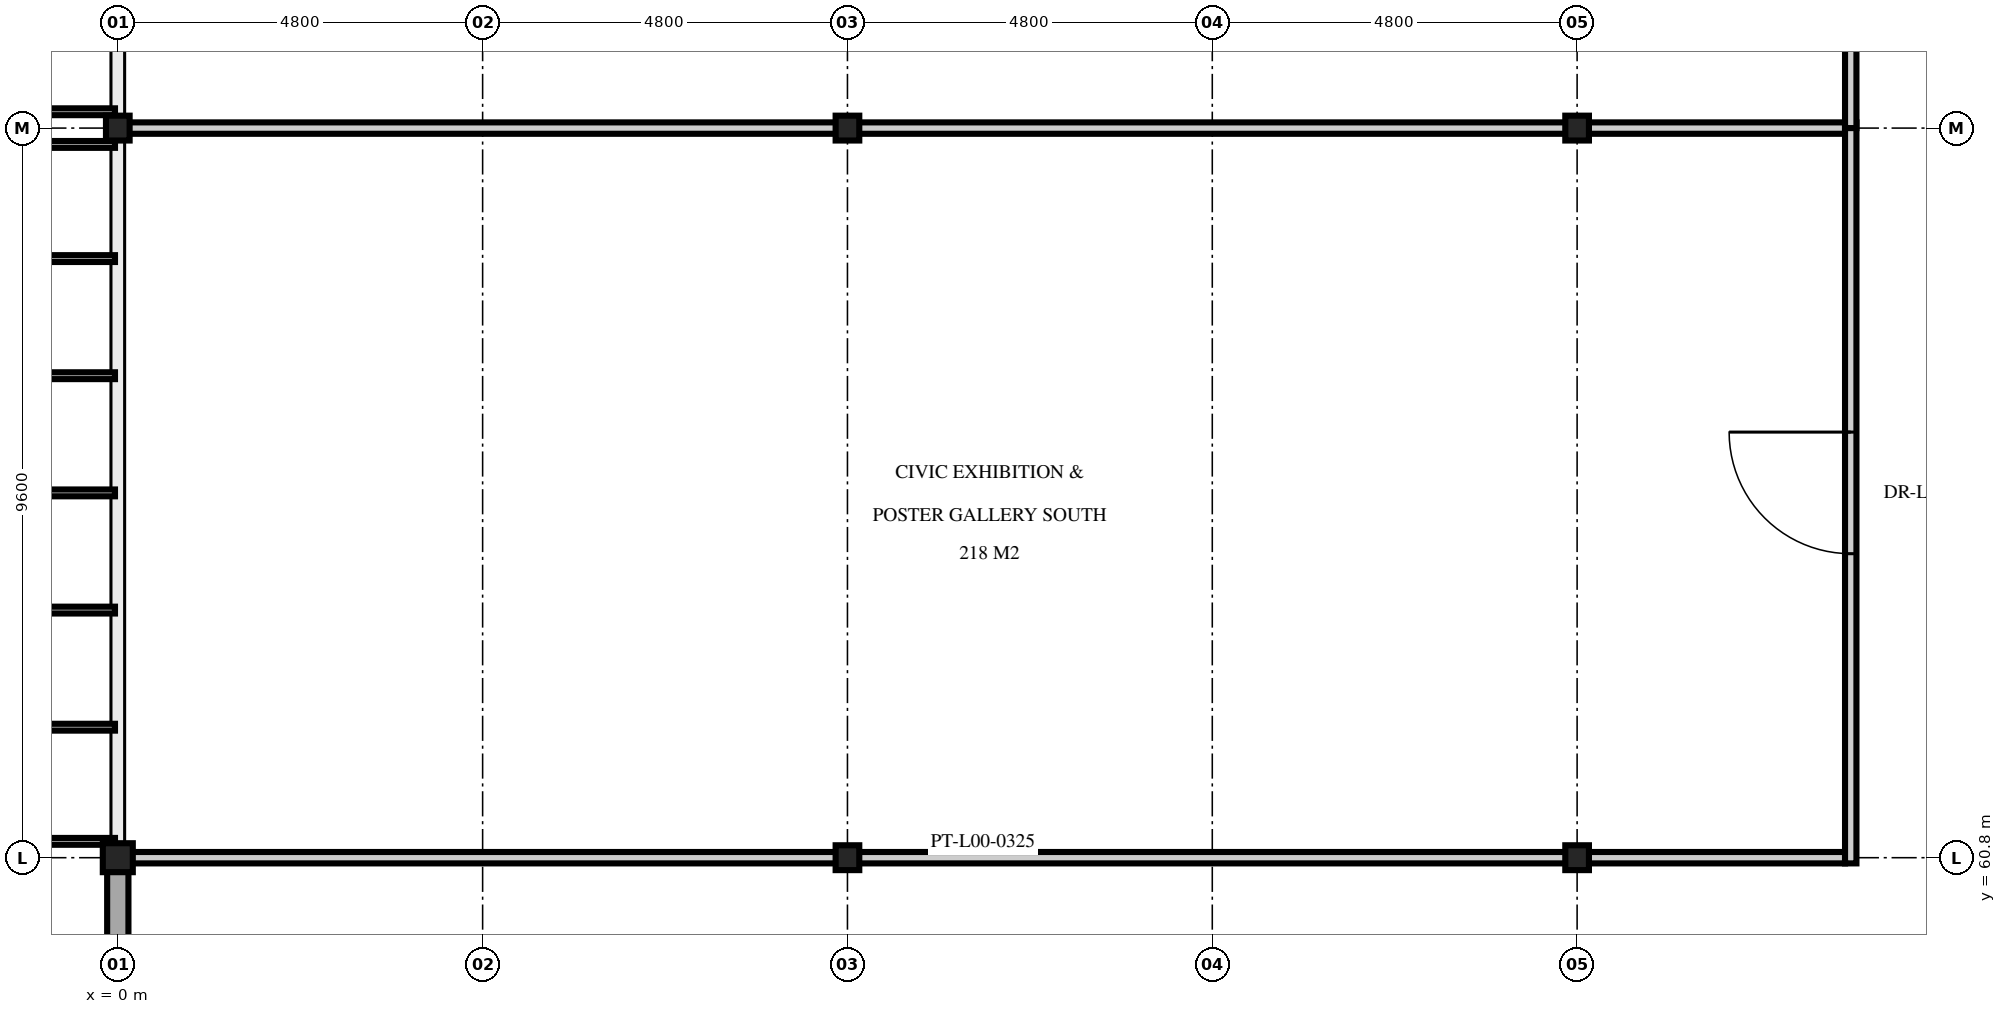
"""IFC4 building model, lengths in metres.
Left out: names, types, materials, properties, quantities, classifications, styles, units other than length and angle.
Written with IfcOpenShell. Run it as: python <this file> out.ifc"""

import sys

from ifc_helpers import new_model, si_unit, direction, frame, frame_2d, origin, origin_2d, place, context, subcontext, project, spatial, rectangle, i_section, extrude, element, fill, save


model = new_model("IFC4")
c1 = context("Model", 3, precision=1e-05, world=origin(), true_north=direction((0.0, 1.0)))
c2 = subcontext(c1, "Body", "Model", "MODEL_VIEW")
j1 = project(units=[si_unit("LENGTHUNIT", "METRE"), si_unit("PLANEANGLEUNIT", "RADIAN")], contexts=[c1])
p1 = place(None, origin())
s1 = spatial("IfcSite", under=j1, at=p1, CompositionType="ELEMENT")
p2 = place(p1, origin())
s2 = spatial("IfcBuilding", under=s1, at=p2, CompositionType="ELEMENT")
p3 = place(p2, origin())
s3 = spatial("IfcBuildingStorey", under=s2, at=p3, CompositionType="ELEMENT", Elevation=0.0)
p4 = place(p3, frame((0.0, 60.8, 0.0), z_axis=(0.0, 0.0, 1.0), x_axis=(1.0, 0.0, 0.0)))
e1 = element("IfcColumn", 1, at=p4, inside=s3, PredefinedType="COLUMN", context=c2, shape_type="SweptSolid", body=[
    extrude(i_section(OverallWidth=0.395, OverallDepth=0.381, WebThickness=0.018, FlangeThickness=0.03, at=origin_2d()), origin(), (0.0, 0.0, 1.0), 5.1),
])
for number, where, z_axis, x_axis in (
    (2, (9.6, 60.8, 0.0), (0.0, 0.0, 1.0), (1.0, 0.0, 0.0)),
    (3, (19.2, 60.8, 0.0), (0.0, 0.0, 1.0), (1.0, 0.0, 0.0)),
    (4, (0.0, 70.4, 0.0), (0.0, 0.0, 1.0), (1.0, 0.0, 0.0)),
    (5, (9.6, 70.4, 0.0), (0.0, 0.0, 1.0), (1.0, 0.0, 0.0)),
    (6, (19.2, 70.4, 0.0), (0.0, 0.0, 1.0), (1.0, 0.0, 0.0)),
):
    element("IfcColumn", number, at=place(p3, frame(where, z_axis=z_axis, x_axis=x_axis)), inside=s3, PredefinedType="COLUMN", context=c2, shape_type="SweptSolid", body=[
        extrude(i_section(OverallWidth=0.311, OverallDepth=0.327, WebThickness=0.016, FlangeThickness=0.025, at=origin_2d()), origin(), (0.0, 0.0, 1.0), 5.1),
    ])
p5 = place(p3, frame((0.0, 55.915, 0.0), z_axis=(0.0, 0.0, 1.0), x_axis=(0.0, 1.0, 0.0)))
e7 = element("IfcWall", 7, at=p5, inside=s3, PredefinedType="SOLIDWALL", context=c2, shape_type="SweptSolid", body=[
    extrude(rectangle(XDim=4.97, YDim=0.28, at=frame_2d((2.485, 0.0))), origin(), (0.0, 0.0, 1.0), 4.322),
])
p6 = place(p3, frame((0.04, 60.8, 0.0), z_axis=(0.0, 0.0, 1.0), x_axis=(1.0, 0.0, 0.0)))
e8 = element("IfcWall", 8, at=p6, inside=s3, PredefinedType="PARTITIONING", context=c2, shape_type="SweptSolid", body=[
    extrude(rectangle(XDim=22.685, YDim=0.15, at=frame_2d((11.343, 0.0))), origin(), (0.0, 0.0, 1.0), 4.322),
])
p7 = place(p3, frame((0.04, 70.4, 0.0), z_axis=(0.0, 0.0, 1.0), x_axis=(1.0, 0.0, 0.0)))
e9 = element("IfcWall", 9, at=p7, inside=s3, PredefinedType="PARTITIONING", context=c2, shape_type="SweptSolid", body=[
    extrude(rectangle(XDim=22.685, YDim=0.15, at=frame_2d((11.343, 0.0))), origin(), (0.0, 0.0, 1.0), 4.355),
])
p8 = place(p3, frame((22.8, 60.725, 0.0), z_axis=(0.0, 0.0, 1.0), x_axis=(0.0, 1.0, 0.0)))
e10 = element("IfcWall", 10, at=p8, inside=s3, PredefinedType="PARTITIONING", context=c2, shape_type="SweptSolid", body=[
    extrude(rectangle(XDim=9.75, YDim=0.15, at=frame_2d((4.875, 0.0))), origin(), (0.0, 0.0, 1.0), 4.355),
])
p9 = place(p8, frame((4.075, 0.0, 0.0)))
e11 = element("IfcOpeningElement", 11, at=p9, cuts=e10, PredefinedType="OPENING", context=c2, shape_type="SweptSolid", body=[
    extrude(rectangle(XDim=1.6, YDim=2.25, at=frame_2d((0.8, 1.125))), frame((0.0, 0.085, 0.0), z_axis=(0.0, -1.0, 0.0), x_axis=(1.0, 0.0, 0.0)), (0.0, 0.0, 1.0), 0.17),
])
p10 = place(p3, frame((22.8, 70.4, 0.0), z_axis=(0.0, 0.0, 1.0), x_axis=(0.0, 1.0, 0.0)))
e12 = element("IfcWall", 12, at=p10, inside=s3, PredefinedType="PARTITIONING", context=c2, shape_type="SweptSolid", body=[
    extrude(rectangle(XDim=9.675, YDim=0.15, at=frame_2d((4.837, 0.0))), origin(), (0.0, 0.0, 1.0), 4.355),
])
p11 = place(p10, frame((4.362, 0.0, 0.0)))
e13 = element("IfcOpeningElement", 13, at=p11, cuts=e12, PredefinedType="OPENING", context=c2, shape_type="SweptSolid", body=[
    extrude(rectangle(XDim=0.95, YDim=2.15, at=frame_2d((0.475, 1.075))), frame((0.0, 0.085, 0.0), z_axis=(0.0, -1.0, 0.0), x_axis=(1.0, 0.0, 0.0)), (0.0, 0.0, 1.0), 0.17),
])
p12 = place(p9, origin())
e14 = element("IfcDoor", 14, at=p12, inside=s3, OperationType="DOUBLE_DOOR_SINGLE_SWING", PredefinedType="DOOR", context=c2, shape_type="SweptSolid", body=[
    extrude(rectangle(XDim=1.6, YDim=2.25, at=frame_2d((0.8, 1.125))), frame((0.0, 0.025, 0.0), z_axis=(0.0, -1.0, 0.0), x_axis=(1.0, 0.0, 0.0)), (0.0, 0.0, 1.0), 0.05),
])
fill(e11, e14)
save(model, sys.argv[1])
